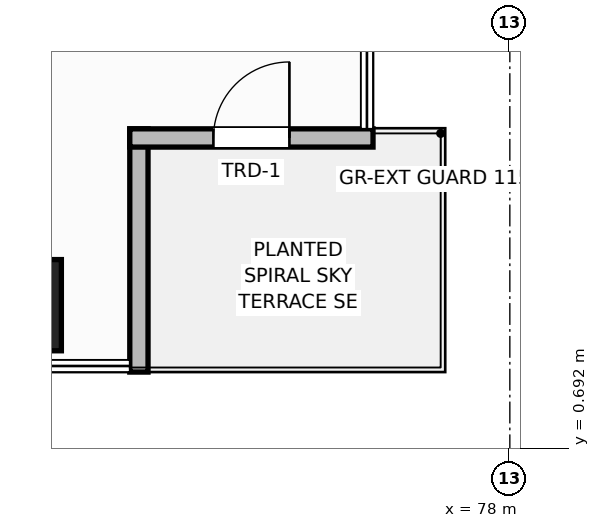
"""IFC4 building model, lengths in metres.
Left out: names, types, materials, properties, quantities, classifications, styles, units other than length and angle.
Written with IfcOpenShell. Run it as: python <this file> out.ifc"""

import sys

from ifc_helpers import new_model, si_unit, direction, frame, frame_2d, origin, origin_2d, place, context, subcontext, project, spatial, rectangle, extrude, element, fill, save


model = new_model("IFC4")
c1 = context("Model", 3, precision=1e-05, world=origin(), true_north=direction((0.0, 1.0)))
c2 = subcontext(c1, "Body", "Model", "MODEL_VIEW")
j1 = project(units=[si_unit("LENGTHUNIT", "METRE"), si_unit("PLANEANGLEUNIT", "RADIAN")], contexts=[c1])
p1 = place(None, origin())
s1 = spatial("IfcSite", under=j1, at=p1, CompositionType="ELEMENT")
p2 = place(p1, origin())
s2 = spatial("IfcBuilding", under=s1, at=p2, CompositionType="ELEMENT")
p3 = place(p2, frame((0.0, 0.0, 120.2)))
s3 = spatial("IfcBuildingStorey", under=s2, at=p3, CompositionType="ELEMENT", Elevation=120.2)
p4 = place(p3, frame((71.5, 2.58, 0.0), z_axis=(0.0, 0.0, 1.0), x_axis=(1.0, 0.0, 0.0)))
e1 = element("IfcColumn", 1, at=p4, inside=s3, PredefinedType="COLUMN", context=c2, shape_type="SweptSolid", body=[
    extrude(rectangle(XDim=1.2, YDim=1.2, at=origin_2d()), origin(), (0.0, 0.0, 1.0), 3.8),
])
p5 = place(p3, frame((73.12, 4.9, 0.0), z_axis=(0.0, 0.0, 1.0), x_axis=(0.0, -1.0, 0.0)))
e2 = element("IfcWall", 2, at=p5, inside=s3, PredefinedType="STANDARD", context=c2, shape_type="SweptSolid", body=[
    extrude(rectangle(XDim=3.2, YDim=0.24, at=frame_2d((1.6, 0.0))), origin(), (0.0, 0.0, 1.0), 3.565),
])
p6 = place(p3, frame((76.2, 4.78, 0.0), z_axis=(0.0, 0.0, 1.0), x_axis=(-1.0, 0.0, 0.0)))
e3 = element("IfcWall", 3, at=p6, inside=s3, PredefinedType="STANDARD", context=c2, shape_type="SweptSolid", body=[
    extrude(rectangle(XDim=3.2, YDim=0.24, at=frame_2d((1.6, 0.0))), origin(), (0.0, 0.0, 1.0), 3.565),
])
p7 = place(p6, frame((1.1, 0.0, 0.0)))
e4 = element("IfcOpeningElement", 4, at=p7, cuts=e3, PredefinedType="OPENING", context=c2, shape_type="SweptSolid", body=[
    extrude(rectangle(XDim=1.0, YDim=2.2, at=frame_2d((0.5, 1.1))), frame((0.0, 0.13, 0.0), z_axis=(0.0, -1.0, 0.0), x_axis=(1.0, 0.0, 0.0)), (0.0, 0.0, 1.0), 0.26),
])
p8 = place(p7, origin())
e5 = element("IfcDoor", 5, at=p8, inside=s3, OperationType="SINGLE_SWING_RIGHT", PredefinedType="DOOR", context=c2, shape_type="SweptSolid", body=[
    extrude(rectangle(XDim=1.0, YDim=2.2, at=frame_2d((0.5, 1.1))), frame((0.0, 0.025, 0.0), z_axis=(0.0, -1.0, 0.0), x_axis=(1.0, 0.0, 0.0)), (0.0, 0.0, 1.0), 0.05),
])
fill(e4, e5)
save(model, sys.argv[1])
